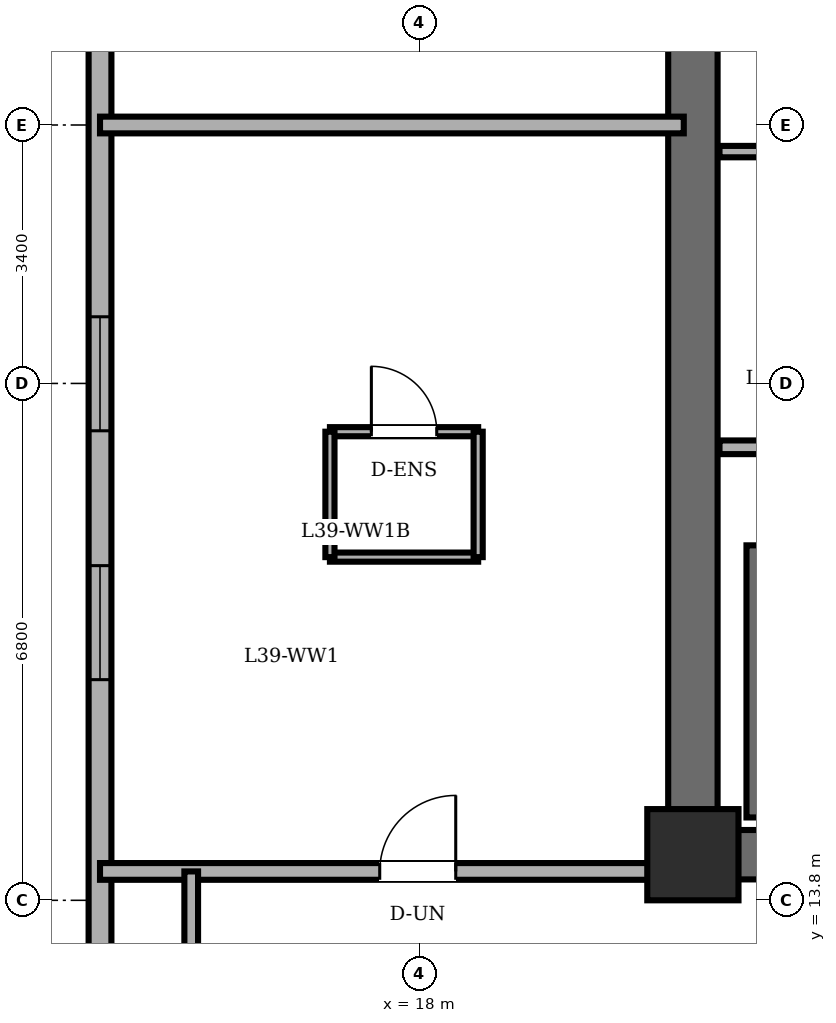
"""IFC4 building model, lengths in metres.
Left out: names, types, materials, properties, quantities, classifications, styles, units other than length and angle.
Written with IfcOpenShell. Run it as: python <this file> out.ifc"""

import sys

from ifc_helpers import new_model, si_unit, direction, frame, frame_2d, origin, origin_2d, place, context, subcontext, project, spatial, rectangle, extrude, element, fill, save


model = new_model("IFC4")
c1 = context("Model", 3, precision=1e-05, world=origin(), true_north=direction((0.0, 1.0)))
c2 = subcontext(c1, "Body", "Model", "MODEL_VIEW")
j1 = project(units=[si_unit("LENGTHUNIT", "METRE"), si_unit("PLANEANGLEUNIT", "RADIAN")], contexts=[c1])
p1 = place(None, origin())
s1 = spatial("IfcSite", under=j1, at=p1, CompositionType="ELEMENT")
p2 = place(p1, origin())
s2 = spatial("IfcBuilding", under=s1, at=p2, CompositionType="ELEMENT")
p3 = place(p2, frame((0.0, 0.0, 151.0)))
s3 = spatial("IfcBuildingStorey", under=s2, at=p3, CompositionType="ELEMENT", Elevation=151.0)
p4 = place(p3, frame((21.6, 14.4, 0.0), z_axis=(0.0, 0.0, 1.0), x_axis=(1.0, 0.0, 0.0)))
e1 = element("IfcColumn", 1, at=p4, inside=s3, PredefinedType="COLUMN", context=c2, shape_type="SweptSolid", body=[
    extrude(rectangle(XDim=1.2, YDim=1.2, at=origin_2d()), origin(), (0.0, 0.0, 1.0), 3.6),
])
p5 = place(p3, frame((13.8, 36.3, 0.0), z_axis=(0.0, 0.0, 1.0), x_axis=(0.0, -1.0, 0.0)))
e2 = element("IfcWall", 2, at=p5, inside=s3, PredefinedType="SOLIDWALL", context=c2, shape_type="SweptSolid", body=[
    extrude(rectangle(XDim=24.6, YDim=0.3, at=frame_2d((12.3, 0.0))), origin(), (0.0, 0.0, 1.0), 3.4),
])
p6 = place(p5, frame((5.003, 0.0, 0.85)))
e3 = element("IfcOpeningElement", 3, at=p6, cuts=e2, PredefinedType="OPENING", context=c2, shape_type="SweptSolid", body=[
    extrude(rectangle(XDim=1.5, YDim=1.55, at=frame_2d((0.75, 0.775))), frame((0.0, 0.16, 0.0), z_axis=(0.0, -1.0, 0.0), x_axis=(1.0, 0.0, 0.0)), (0.0, 0.0, 1.0), 0.32),
])
p7 = place(p5, frame((8.277, 0.0, 0.85)))
e4 = element("IfcOpeningElement", 4, at=p7, cuts=e2, PredefinedType="OPENING", context=c2, shape_type="SweptSolid", body=[
    extrude(rectangle(XDim=1.5, YDim=1.55, at=frame_2d((0.75, 0.775))), frame((0.0, 0.16, 0.0), z_axis=(0.0, -1.0, 0.0), x_axis=(1.0, 0.0, 0.0)), (0.0, 0.0, 1.0), 0.32),
])
p8 = place(p5, frame((14.823, 0.0, 0.85)))
e5 = element("IfcOpeningElement", 5, at=p8, cuts=e2, PredefinedType="OPENING", context=c2, shape_type="SweptSolid", body=[
    extrude(rectangle(XDim=1.5, YDim=1.55, at=frame_2d((0.75, 0.775))), frame((0.0, 0.16, 0.0), z_axis=(0.0, -1.0, 0.0), x_axis=(1.0, 0.0, 0.0)), (0.0, 0.0, 1.0), 0.32),
])
p9 = place(p5, frame((18.097, 0.0, 0.85)))
e6 = element("IfcOpeningElement", 6, at=p9, cuts=e2, PredefinedType="OPENING", context=c2, shape_type="SweptSolid", body=[
    extrude(rectangle(XDim=1.5, YDim=1.55, at=frame_2d((0.75, 0.775))), frame((0.0, 0.16, 0.0), z_axis=(0.0, -1.0, 0.0), x_axis=(1.0, 0.0, 0.0)), (0.0, 0.0, 1.0), 0.32),
])
p10 = place(p3, frame((21.6, 14.4, 0.0), z_axis=(0.0, 0.0, 1.0), x_axis=(0.0, 1.0, 0.0)))
e7 = element("IfcWall", 7, at=p10, inside=s3, PredefinedType="SHEAR", context=c2, shape_type="SweptSolid", body=[
    extrude(rectangle(XDim=19.2, YDim=0.65, at=frame_2d((9.6, 0.0))), origin(), (0.0, 0.0, 1.0), 3.4),
])
p11 = place(p3, frame((37.2, 14.4, 0.0), z_axis=(0.0, 0.0, 1.0), x_axis=(-1.0, 0.0, 0.0)))
e8 = element("IfcWall", 8, at=p11, inside=s3, PredefinedType="SHEAR", context=c2, shape_type="SweptSolid", body=[
    extrude(rectangle(XDim=15.6, YDim=0.65, at=frame_2d((7.8, 0.0))), origin(), (0.0, 0.0, 1.0), 3.4),
])
p12 = place(p3, frame((22.48, 14.89, 0.0), z_axis=(0.0, 0.0, 1.0), x_axis=(0.0, 1.0, 0.0)))
e9 = element("IfcWall", 9, at=p12, inside=s3, PredefinedType="SOLIDWALL", context=c2, shape_type="SweptSolid", body=[
    extrude(rectangle(XDim=3.58, YDim=0.35, at=frame_2d((1.79, 0.0))), origin(), (0.0, 0.0, 1.0), 3.4),
])
p13 = place(p3, frame((21.95, 19.76, 0.0), z_axis=(0.0, 0.0, 1.0), x_axis=(1.0, 0.0, 0.0)))
e10 = element("IfcWall", 10, at=p13, inside=s3, PredefinedType="PARTITIONING", context=c2, shape_type="SweptSolid", body=[
    extrude(rectangle(XDim=14.87, YDim=0.18, at=frame_2d((7.435, 0.0))), origin(), (0.0, 0.0, 1.0), 3.4),
])
p14 = place(p3, frame((21.95, 23.65, 0.0), z_axis=(0.0, 0.0, 1.0), x_axis=(1.0, 0.0, 0.0)))
e11 = element("IfcWall", 11, at=p14, inside=s3, PredefinedType="PARTITIONING", context=c2, shape_type="SweptSolid", body=[
    extrude(rectangle(XDim=2.51, YDim=0.15, at=frame_2d((1.255, 0.0))), origin(), (0.0, 0.0, 1.0), 3.4),
])
p15 = place(p3, frame((16.825, 19.965, 0.0), z_axis=(0.0, 0.0, 1.0), x_axis=(1.0, 0.0, 0.0)))
e12 = element("IfcWall", 12, at=p15, inside=s3, PredefinedType="PARTITIONING", context=c2, shape_type="SweptSolid", body=[
    extrude(rectangle(XDim=1.95, YDim=0.12, at=frame_2d((0.975, 0.0))), origin(), (0.0, 0.0, 1.0), 3.4),
])
p16 = place(p15, frame((0.545, 0.0, 0.0)))
e13 = element("IfcOpeningElement", 13, at=p16, cuts=e12, PredefinedType="OPENING", context=c2, shape_type="SweptSolid", body=[
    extrude(rectangle(XDim=0.86, YDim=2.1, at=frame_2d((0.43, 1.05))), frame((0.0, 0.07, 0.0), z_axis=(0.0, -1.0, 0.0), x_axis=(1.0, 0.0, 0.0)), (0.0, 0.0, 1.0), 0.14),
])
p17 = place(p3, frame((18.775, 18.315, 0.0), z_axis=(0.0, 0.0, 1.0), x_axis=(-1.0, 0.0, 0.0)))
e14 = element("IfcWall", 14, at=p17, inside=s3, PredefinedType="PARTITIONING", context=c2, shape_type="SweptSolid", body=[
    extrude(rectangle(XDim=1.95, YDim=0.12, at=frame_2d((0.975, 0.0))), origin(), (0.0, 0.0, 1.0), 3.4),
])
for number, where, z_axis, x_axis in (
    (15, (16.825, 19.965, 0.0), (0.0, 0.0, 1.0), (0.0, -1.0, 0.0)),
    (16, (18.775, 18.315, 0.0), (0.0, 0.0, 1.0), (0.0, 1.0, 0.0)),
):
    element("IfcWall", number, at=place(p3, frame(where, z_axis=z_axis, x_axis=x_axis)), inside=s3, PredefinedType="PARTITIONING", context=c2, shape_type="SweptSolid", body=[
        extrude(rectangle(XDim=1.65, YDim=0.12, at=frame_2d((0.825, 0.0))), origin(), (0.0, 0.0, 1.0), 3.4),
    ])
p18 = place(p3, frame((13.8, 14.18, 0.0), z_axis=(0.0, 0.0, 1.0), x_axis=(1.0, 0.0, 0.0)))
e17 = element("IfcWall", 17, at=p18, inside=s3, PredefinedType="PARTITIONING", context=c2, shape_type="SweptSolid", body=[
    extrude(rectangle(XDim=7.68, YDim=0.22, at=frame_2d((3.84, 0.0))), origin(), (0.0, 0.0, 1.0), 3.4),
])
p19 = place(p18, frame((3.68, 0.0, 0.0)))
e18 = element("IfcOpeningElement", 18, at=p19, cuts=e17, PredefinedType="OPENING", context=c2, shape_type="SweptSolid", body=[
    extrude(rectangle(XDim=1.0, YDim=2.15, at=frame_2d((0.5, 1.075))), frame((0.0, 0.12, 0.0), z_axis=(0.0, -1.0, 0.0), x_axis=(1.0, 0.0, 0.0)), (0.0, 0.0, 1.0), 0.24),
])
p20 = place(p3, frame((13.8, 24.0, 0.0), z_axis=(0.0, 0.0, 1.0), x_axis=(1.0, 0.0, 0.0)))
e19 = element("IfcWall", 19, at=p20, inside=s3, PredefinedType="PARTITIONING", context=c2, shape_type="SweptSolid", body=[
    extrude(rectangle(XDim=7.68, YDim=0.22, at=frame_2d((3.84, 0.0))), origin(), (0.0, 0.0, 1.0), 3.4),
])
p21 = place(p3, frame((15.0, 8.487, 0.0), z_axis=(0.0, 0.0, 1.0), x_axis=(0.0, 1.0, 0.0)))
e20 = element("IfcWall", 20, at=p21, inside=s3, PredefinedType="PARTITIONING", context=c2, shape_type="SweptSolid", body=[
    extrude(rectangle(XDim=5.693, YDim=0.18, at=frame_2d((2.846, 0.0))), origin(), (0.0, 0.0, 1.0), 3.4),
])
p22 = place(p8, origin())
e21 = element("IfcWindow", 21, at=p22, inside=s3, PartitioningType="DOUBLE_PANEL_VERTICAL", PredefinedType="WINDOW", context=c2, shape_type="SweptSolid", body=[
    extrude(rectangle(XDim=1.5, YDim=1.55, at=frame_2d((0.75, 0.775))), frame((0.0, 0.03, 0.0), z_axis=(0.0, -1.0, 0.0), x_axis=(1.0, 0.0, 0.0)), (0.0, 0.0, 1.0), 0.06),
])
fill(e5, e21)
p23 = place(p9, origin())
e22 = element("IfcWindow", 22, at=p23, inside=s3, PartitioningType="DOUBLE_PANEL_VERTICAL", PredefinedType="WINDOW", context=c2, shape_type="SweptSolid", body=[
    extrude(rectangle(XDim=1.5, YDim=1.55, at=frame_2d((0.75, 0.775))), frame((0.0, 0.03, 0.0), z_axis=(0.0, -1.0, 0.0), x_axis=(1.0, 0.0, 0.0)), (0.0, 0.0, 1.0), 0.06),
])
fill(e6, e22)
p24 = place(p16, origin())
e23 = element("IfcDoor", 23, at=p24, inside=s3, OperationType="SINGLE_SWING_LEFT", PredefinedType="DOOR", context=c2, shape_type="SweptSolid", body=[
    extrude(rectangle(XDim=0.86, YDim=2.1, at=frame_2d((0.43, 1.05))), frame((0.0, 0.025, 0.0), z_axis=(0.0, -1.0, 0.0), x_axis=(1.0, 0.0, 0.0)), (0.0, 0.0, 1.0), 0.05),
])
fill(e13, e23)
p25 = place(p19, origin())
e24 = element("IfcDoor", 24, at=p25, inside=s3, OperationType="SINGLE_SWING_RIGHT", PredefinedType="DOOR", context=c2, shape_type="SweptSolid", body=[
    extrude(rectangle(XDim=1.0, YDim=2.15, at=frame_2d((0.5, 1.075))), frame((0.0, 0.025, 0.0), z_axis=(0.0, -1.0, 0.0), x_axis=(1.0, 0.0, 0.0)), (0.0, 0.0, 1.0), 0.05),
])
fill(e18, e24)
save(model, sys.argv[1])
